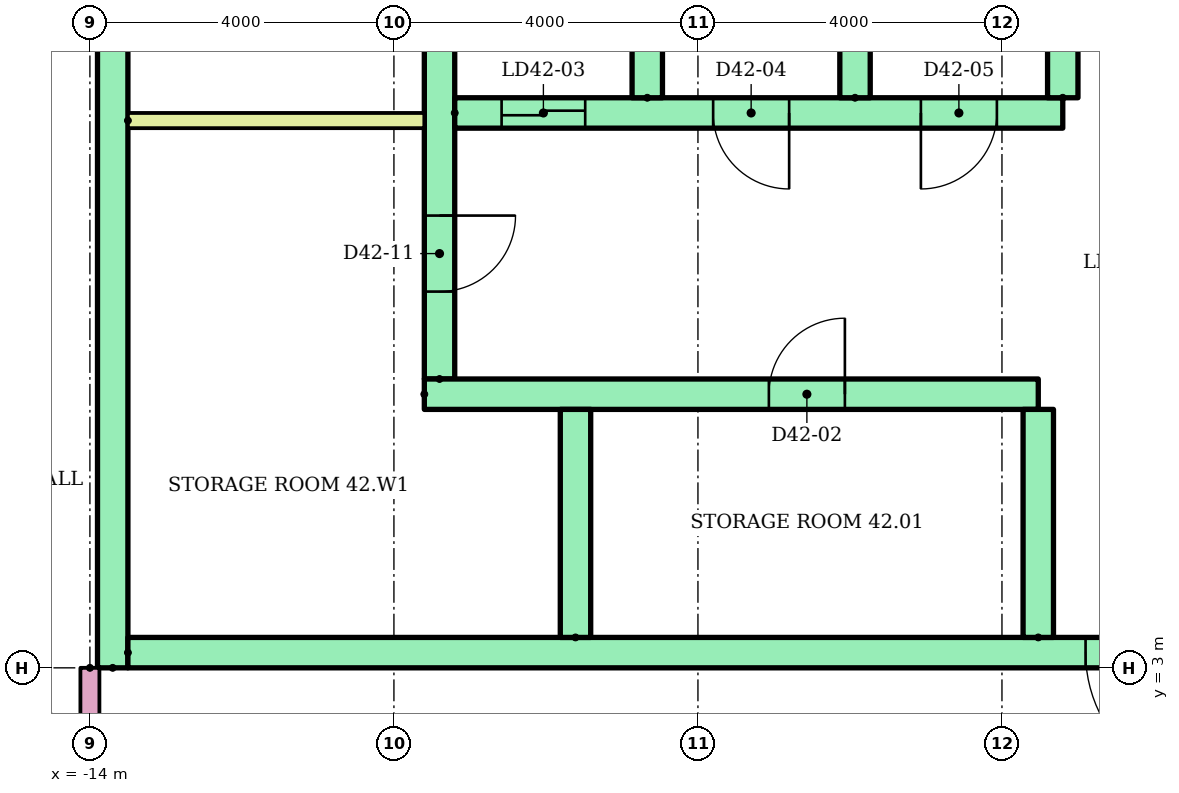
"""IFC4 building model, lengths in metres.
Left out: names, types, materials, properties, quantities, classifications, styles, units other than length and angle.
Written with IfcOpenShell. Run it as: python <this file> out.ifc"""

import sys

from ifc_helpers import new_model, si_unit, direction, frame, frame_2d, origin, place, context, subcontext, project, spatial, rectangle, extrude, element, fill, save


model = new_model("IFC4")
c1 = context("Model", 3, precision=1e-05, world=origin(), true_north=direction((0.0, 1.0)))
c2 = subcontext(c1, "Body", "Model", "MODEL_VIEW")
j1 = project(units=[si_unit("LENGTHUNIT", "METRE"), si_unit("PLANEANGLEUNIT", "RADIAN")], contexts=[c1])
p1 = place(None, origin())
s1 = spatial("IfcSite", under=j1, at=p1, CompositionType="ELEMENT")
p2 = place(p1, origin())
s2 = spatial("IfcBuilding", under=s1, at=p2, CompositionType="ELEMENT")
p3 = place(p2, frame((0.0, 0.0, 165.3)))
s3 = spatial("IfcBuildingStorey", under=s2, at=p3, CompositionType="ELEMENT", Elevation=165.3)
p4 = place(p3, frame((-13.7, 3.0, 0.0), z_axis=(0.0, 0.0, 1.0), x_axis=(0.0, 1.0, 0.0)))
e1 = element("IfcWall", 1, at=p4, inside=s3, PredefinedType="SHEAR", context=c2, shape_type="SweptSolid", body=[
    extrude(rectangle(XDim=17.0, YDim=0.4, at=frame_2d((8.5, 0.0))), origin(), (0.0, 0.0, 1.0), 2.92),
])
p5 = place(p3, frame((-9.4, 6.8, 0.0), z_axis=(0.0, 0.0, 1.0), x_axis=(0.0, 1.0, 0.0)))
e2 = element("IfcWall", 2, at=p5, inside=s3, PredefinedType="SHEAR", context=c2, shape_type="SweptSolid", body=[
    extrude(rectangle(XDim=12.7, YDim=0.4, at=frame_2d((6.35, 0.0))), origin(), (0.0, 0.0, 1.0), 2.92),
])
p6 = place(p5, frame((1.15, 0.0, 0.0)))
e3 = element("IfcOpeningElement", 3, at=p6, cuts=e2, PredefinedType="OPENING", context=c2, shape_type="SweptSolid", body=[
    extrude(rectangle(XDim=1.0, YDim=2.1, at=frame_2d((0.5, 1.05))), frame((0.0, 0.21, 0.0), z_axis=(0.0, -1.0, 0.0), x_axis=(1.0, 0.0, 0.0)), (0.0, 0.0, 1.0), 0.42),
])
p7 = place(p5, frame((7.925, 0.0, 0.0)))
e4 = element("IfcOpeningElement", 4, at=p7, cuts=e2, PredefinedType="OPENING", context=c2, shape_type="SweptSolid", body=[
    extrude(rectangle(XDim=1.0, YDim=2.1, at=frame_2d((0.5, 1.05))), frame((0.0, 0.21, 0.0), z_axis=(0.0, -1.0, 0.0), x_axis=(1.0, 0.0, 0.0)), (0.0, 0.0, 1.0), 0.42),
])
p8 = place(p3, frame((-13.5, 3.2, 0.0)))
e5 = element("IfcWall", 5, at=p8, inside=s3, PredefinedType="SHEAR", context=c2, shape_type="SweptSolid", body=[
    extrude(rectangle(XDim=27.0, YDim=0.4, at=frame_2d((13.5, 0.0))), origin(), (0.0, 0.0, 1.0), 2.92),
])
p9 = place(p8, frame((22.083, 0.0, 0.0)))
e6 = element("IfcOpeningElement", 6, at=p9, cuts=e5, PredefinedType="OPENING", context=c2, shape_type="SweptSolid", body=[
    extrude(rectangle(XDim=1.1, YDim=2.1, at=frame_2d((0.55, 1.05))), frame((0.0, 0.21, 0.0), z_axis=(0.0, -1.0, 0.0), x_axis=(1.0, 0.0, 0.0)), (0.0, 0.0, 1.0), 0.42),
])
p10 = place(p8, frame((25.128, 0.0, 0.0)))
e7 = element("IfcOpeningElement", 7, at=p10, cuts=e5, PredefinedType="OPENING", context=c2, shape_type="SweptSolid", body=[
    extrude(rectangle(XDim=1.1, YDim=2.1, at=frame_2d((0.55, 1.05))), frame((0.0, 0.21, 0.0), z_axis=(0.0, -1.0, 0.0), x_axis=(1.0, 0.0, 0.0)), (0.0, 0.0, 1.0), 0.42),
])
p11 = place(p8, frame((12.6, 0.0, 0.0)))
e8 = element("IfcOpeningElement", 8, at=p11, cuts=e5, PredefinedType="OPENING", context=c2, shape_type="SweptSolid", body=[
    extrude(rectangle(XDim=1.8, YDim=2.1, at=frame_2d((0.9, 1.05))), frame((0.0, 0.21, 0.0), z_axis=(0.0, -1.0, 0.0), x_axis=(1.0, 0.0, 0.0)), (0.0, 0.0, 1.0), 0.42),
])
p12 = place(p3, frame((-9.6, 6.6, 0.0)))
e9 = element("IfcWall", 9, at=p12, inside=s3, PredefinedType="SHEAR", context=c2, shape_type="SweptSolid", body=[
    extrude(rectangle(XDim=8.078, YDim=0.4, at=frame_2d((4.039, 0.0))), origin(), (0.0, 0.0, 1.0), 2.92),
])
p13 = place(p12, frame((4.533, 0.0, 0.0)))
e10 = element("IfcOpeningElement", 10, at=p13, cuts=e9, PredefinedType="OPENING", context=c2, shape_type="SweptSolid", body=[
    extrude(rectangle(XDim=1.0, YDim=2.1, at=frame_2d((0.5, 1.05))), frame((0.0, 0.21, 0.0), z_axis=(0.0, -1.0, 0.0), x_axis=(1.0, 0.0, 0.0)), (0.0, 0.0, 1.0), 0.42),
])
for number, where, z_axis, x_axis in (
    (11, (-7.611, 3.4, 0.0), (0.0, 0.0, 1.0), (0.0, 1.0, 0.0)),
    (12, (-1.522, 3.4, 0.0), (0.0, 0.0, 1.0), (0.0, 1.0, 0.0)),
):
    element("IfcWall", number, at=place(p3, frame(where, z_axis=z_axis, x_axis=x_axis)), inside=s3, PredefinedType="SHEAR", context=c2, shape_type="SweptSolid", body=[
        extrude(rectangle(XDim=3.0, YDim=0.4, at=frame_2d((1.5, 0.0))), origin(), (0.0, 0.0, 1.0), 2.92),
    ])
p14 = place(p3, frame((-9.2, 10.3, 0.0)))
e13 = element("IfcWall", 13, at=p14, inside=s3, PredefinedType="SHEAR", context=c2, shape_type="SweptSolid", body=[
    extrude(rectangle(XDim=8.0, YDim=0.4, at=frame_2d((4.0, 0.0))), origin(), (0.0, 0.0, 1.0), 2.92),
])
p15 = place(p14, frame((0.617, 0.0, 0.0)))
e14 = element("IfcOpeningElement", 14, at=p15, cuts=e13, PredefinedType="OPENING", context=c2, shape_type="SweptSolid", body=[
    extrude(rectangle(XDim=1.1, YDim=2.1, at=frame_2d((0.55, 1.05))), frame((0.0, 0.21, 0.0), z_axis=(0.0, -1.0, 0.0), x_axis=(1.0, 0.0, 0.0)), (0.0, 0.0, 1.0), 0.42),
])
p16 = place(p14, frame((3.4, 0.0, 0.0)))
e15 = element("IfcOpeningElement", 15, at=p16, cuts=e13, PredefinedType="OPENING", context=c2, shape_type="SweptSolid", body=[
    extrude(rectangle(XDim=1.0, YDim=2.1, at=frame_2d((0.5, 1.05))), frame((0.0, 0.21, 0.0), z_axis=(0.0, -1.0, 0.0), x_axis=(1.0, 0.0, 0.0)), (0.0, 0.0, 1.0), 0.42),
])
p17 = place(p14, frame((6.133, 0.0, 0.0)))
e16 = element("IfcOpeningElement", 16, at=p17, cuts=e13, PredefinedType="OPENING", context=c2, shape_type="SweptSolid", body=[
    extrude(rectangle(XDim=1.0, YDim=2.1, at=frame_2d((0.5, 1.05))), frame((0.0, 0.21, 0.0), z_axis=(0.0, -1.0, 0.0), x_axis=(1.0, 0.0, 0.0)), (0.0, 0.0, 1.0), 0.42),
])
for number, where, z_axis, x_axis in (
    (17, (-6.667, 10.5, 0.0), (0.0, 0.0, 1.0), (0.0, 1.0, 0.0)),
    (18, (-3.933, 10.5, 0.0), (0.0, 0.0, 1.0), (0.0, 1.0, 0.0)),
    (19, (-1.2, 10.5, 0.0), (0.0, 0.0, 1.0), (0.0, 1.0, 0.0)),
):
    element("IfcWall", number, at=place(p3, frame(where, z_axis=z_axis, x_axis=x_axis)), inside=s3, PredefinedType="SHEAR", context=c2, shape_type="SweptSolid", body=[
        extrude(rectangle(XDim=3.0, YDim=0.4, at=frame_2d((1.5, 0.0))), origin(), (0.0, 0.0, 1.0), 2.92),
    ])
p18 = place(p3, frame((-13.5, 10.2, 0.0)))
e20 = element("IfcWall", 20, at=p18, inside=s3, PredefinedType="PARTITIONING", context=c2, shape_type="SweptSolid", body=[
    extrude(rectangle(XDim=3.9, YDim=0.2, at=frame_2d((1.95, 0.0))), origin(), (0.0, 0.0, 1.0), 2.92),
])
p19 = place(p3, frame((-14.0, 3.0, 0.0), z_axis=(0.0, 0.0, 1.0), x_axis=(0.0, -1.0, 0.0)))
e21 = element("IfcWall", 21, at=p19, inside=s3, PredefinedType="PARTITIONING", context=c2, shape_type="SweptSolid", body=[
    extrude(rectangle(XDim=1.6, YDim=0.25, at=frame_2d((0.8, 0.0))), origin(), (0.0, 0.0, 1.0), 2.4),
])
p20 = place(p11, frame((1.8, 0.0, 0.0), z_axis=(0.0, 0.0, 1.0), x_axis=(-1.0, 0.0, 0.0)))
e22 = element("IfcDoor", 22, at=p20, inside=s3, OperationType="DOUBLE_DOOR_SINGLE_SWING", PredefinedType="DOOR", context=c2, shape_type="SweptSolid", body=[
    extrude(rectangle(XDim=1.8, YDim=2.1, at=frame_2d((0.9, 1.05))), frame((0.0, 0.025, 0.0), z_axis=(0.0, -1.0, 0.0), x_axis=(1.0, 0.0, 0.0)), (0.0, 0.0, 1.0), 0.05),
])
fill(e8, e22)
p21 = place(p13, origin())
e23 = element("IfcDoor", 23, at=p21, inside=s3, OperationType="SINGLE_SWING_RIGHT", PredefinedType="DOOR", context=c2, shape_type="SweptSolid", body=[
    extrude(rectangle(XDim=1.0, YDim=2.1, at=frame_2d((0.5, 1.05))), frame((0.0, 0.025, 0.0), z_axis=(0.0, -1.0, 0.0), x_axis=(1.0, 0.0, 0.0)), (0.0, 0.0, 1.0), 0.05),
])
fill(e10, e23)
p22 = place(p15, origin())
e24 = element("IfcDoor", 24, at=p22, inside=s3, OperationType="SLIDING_TO_LEFT", PredefinedType="DOOR", context=c2, shape_type="SweptSolid", body=[
    extrude(rectangle(XDim=1.1, YDim=2.1, at=frame_2d((0.55, 1.05))), frame((0.0, 0.025, 0.0), z_axis=(0.0, -1.0, 0.0), x_axis=(1.0, 0.0, 0.0)), (0.0, 0.0, 1.0), 0.05),
])
fill(e14, e24)
p23 = place(p16, frame((1.0, 0.0, 0.0), z_axis=(0.0, 0.0, 1.0), x_axis=(-1.0, 0.0, 0.0)))
e25 = element("IfcDoor", 25, at=p23, inside=s3, OperationType="SINGLE_SWING_RIGHT", PredefinedType="DOOR", context=c2, shape_type="SweptSolid", body=[
    extrude(rectangle(XDim=1.0, YDim=2.1, at=frame_2d((0.5, 1.05))), frame((0.0, 0.025, 0.0), z_axis=(0.0, -1.0, 0.0), x_axis=(1.0, 0.0, 0.0)), (0.0, 0.0, 1.0), 0.05),
])
fill(e15, e25)
p24 = place(p17, frame((1.0, 0.0, 0.0), z_axis=(0.0, 0.0, 1.0), x_axis=(-1.0, 0.0, 0.0)))
e26 = element("IfcDoor", 26, at=p24, inside=s3, OperationType="SINGLE_SWING_LEFT", PredefinedType="DOOR", context=c2, shape_type="SweptSolid", body=[
    extrude(rectangle(XDim=1.0, YDim=2.1, at=frame_2d((0.5, 1.05))), frame((0.0, 0.025, 0.0), z_axis=(0.0, -1.0, 0.0), x_axis=(1.0, 0.0, 0.0)), (0.0, 0.0, 1.0), 0.05),
])
fill(e16, e26)
p25 = place(p6, frame((1.0, 0.0, 0.0), z_axis=(0.0, 0.0, 1.0), x_axis=(-1.0, 0.0, 0.0)))
e27 = element("IfcDoor", 27, at=p25, inside=s3, OperationType="SINGLE_SWING_RIGHT", PredefinedType="DOOR", context=c2, shape_type="SweptSolid", body=[
    extrude(rectangle(XDim=1.0, YDim=2.1, at=frame_2d((0.5, 1.05))), frame((0.0, 0.025, 0.0), z_axis=(0.0, -1.0, 0.0), x_axis=(1.0, 0.0, 0.0)), (0.0, 0.0, 1.0), 0.05),
])
fill(e3, e27)
save(model, sys.argv[1])
